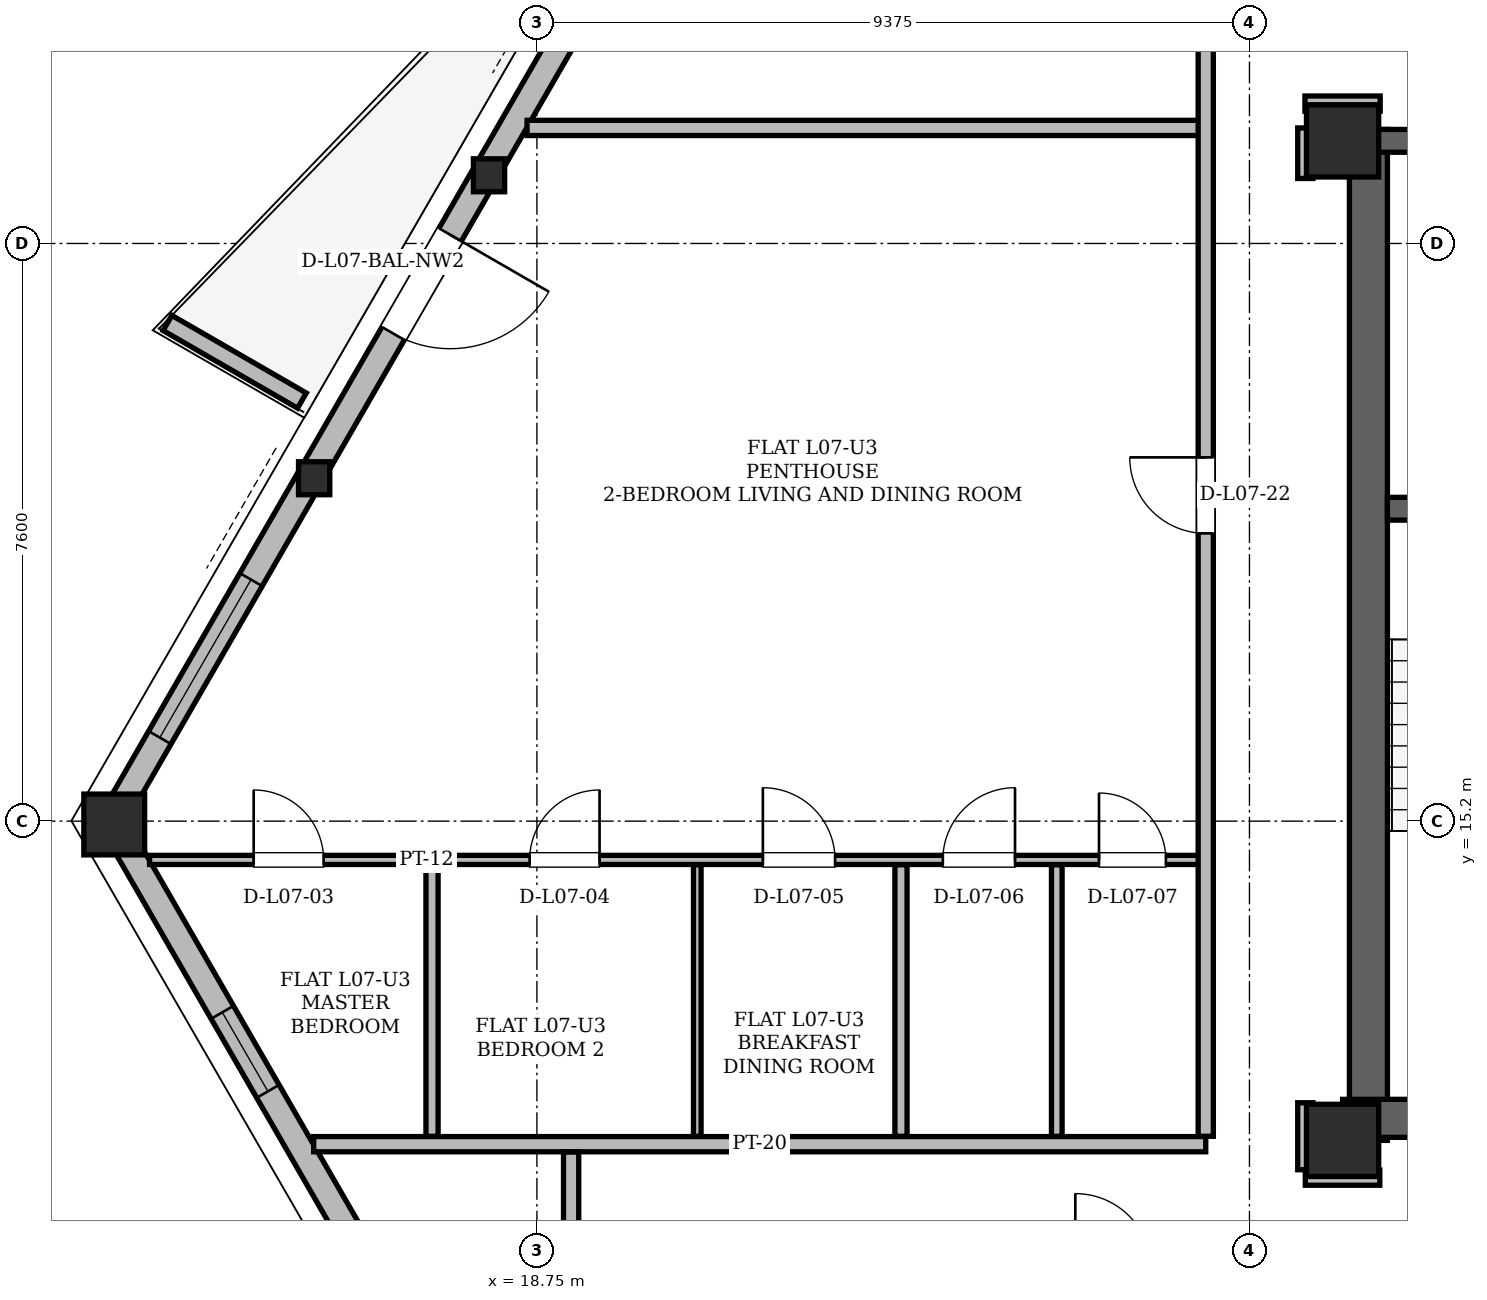
"""IFC4 building model, lengths in metres.
Left out: names, types, materials, properties, quantities, classifications, styles, units other than length and angle.
Written with IfcOpenShell. Run it as: python <this file> out.ifc"""

import sys

from ifc_helpers import new_model, si_unit, direction, frame, frame_2d, origin, origin_2d, place, context, subcontext, project, spatial, polyline, rectangle, hollow_rectangle, i_section, outline, extrude, element, fill, save


model = new_model("IFC4")
c1 = context("Model", 3, precision=1e-05, world=origin(), true_north=direction((0.0, 1.0)))
c2 = subcontext(c1, "Body", "Model", "MODEL_VIEW")
j1 = project(units=[si_unit("LENGTHUNIT", "METRE"), si_unit("PLANEANGLEUNIT", "RADIAN")], contexts=[c1])
p1 = place(None, origin())
s1 = spatial("IfcSite", under=j1, at=p1, CompositionType="ELEMENT")
p2 = place(p1, origin())
s2 = spatial("IfcBuilding", under=s1, at=p2, CompositionType="ELEMENT")
p3 = place(p2, frame((0.0, 0.0, 30.9)))
s3 = spatial("IfcBuildingStorey", under=s2, at=p3, CompositionType="ELEMENT", Elevation=30.9)
for number, where, z_axis, x_axis in (
    (1, (29.35, 11.0, 0.0), (0.0, 0.0, 1.0), (1.0, 0.0, 0.0)),
    (2, (29.35, 24.15, 0.0), (0.0, 0.0, 1.0), (1.0, 0.0, 0.0)),
):
    element("IfcColumn", number, at=place(p3, frame(where, z_axis=z_axis, x_axis=x_axis)), inside=s3, PredefinedType="COLUMN", context=c2, shape_type="SweptSolid", body=[
        extrude(hollow_rectangle(XDim=0.95, YDim=0.95, WallThickness=0.08, at=origin_2d()), origin(), (0.0, 0.0, 1.0), 3.6),
    ])
p4 = place(p3, frame((13.156, 15.204, 0.005), z_axis=(0.018346571143, -0.026500602762, 0.999480425712), x_axis=(0.822192191644, 0.56920997883, 0.0)))
e3 = element("IfcColumn", 3, at=p4, inside=s3, PredefinedType="COLUMN", context=c2, shape_type="SweptSolid", body=[
    extrude(hollow_rectangle(XDim=0.8, YDim=0.8, WallThickness=0.065, at=origin_2d()), origin(), (0.0, 0.0, 1.0), 3.593),
])
p5 = place(p3, frame((18.08, 23.732, 0.005), z_axis=(0.022425422026, -0.019299454107, 0.999562219933), x_axis=(0.652303294881, 0.757958053911, 0.0)))
e4 = element("IfcColumn", 4, at=p5, inside=s3, PredefinedType="COLUMN", context=c2, shape_type="SweptSolid", body=[
    extrude(i_section(OverallWidth=0.411, OverallDepth=0.434, WebThickness=0.036, FlangeThickness=0.057, at=origin_2d()), origin(), (0.0, 0.0, 1.0), 3.593),
])
p6 = place(p3, frame((15.782, 19.752, 0.005), z_axis=(0.020522033279, -0.022696553361, 0.999531746677), x_axis=(0.741746192232, 0.670680688785, 0.0)))
e5 = element("IfcColumn", 5, at=p6, inside=s3, PredefinedType="COLUMN", context=c2, shape_type="SweptSolid", body=[
    extrude(i_section(OverallWidth=0.411, OverallDepth=0.434, WebThickness=0.036, FlangeThickness=0.057, at=origin_2d()), origin(), (0.0, 0.0, 1.0), 3.593),
])
p7 = place(p3, frame((29.69, 11.0, 0.0), z_axis=(0.0, 0.0, 1.0), x_axis=(0.0, 1.0, 0.0)))
e6 = element("IfcWall", 6, at=p7, inside=s3, PredefinedType="SHEAR", context=c2, shape_type="SweptSolid", body=[
    extrude(rectangle(XDim=13.3, YDim=0.5, at=frame_2d((6.65, 0.0))), origin(), (0.0, 0.0, 1.0), 3.36),
])
p8 = place(p3, frame((29.35, 11.29, 0.0), z_axis=(0.0, 0.0, 1.0), x_axis=(1.0, 0.0, 0.0)))
e7 = element("IfcWall", 7, at=p8, inside=s3, PredefinedType="SHEAR", context=c2, shape_type="SweptSolid", body=[
    extrude(rectangle(XDim=7.1, YDim=0.5, at=frame_2d((3.55, 0.0))), origin(), (0.0, 0.0, 1.0), 3.36),
])
p9 = place(p3, frame((29.65, 24.15, 0.0), z_axis=(0.0, 0.0, 1.0), x_axis=(1.0, 0.0, 0.0)))
e8 = element("IfcWall", 8, at=p9, inside=s3, PredefinedType="SHEAR", context=c2, shape_type="SweptSolid", body=[
    extrude(rectangle(XDim=15.7, YDim=0.3, at=frame_2d((7.85, 0.0))), origin(), (0.0, 0.0, 1.0), 3.36),
])
p10 = place(p9, frame((1.7, 0.0, 0.0)))
e9 = element("IfcOpeningElement", 9, at=p10, cuts=e8, PredefinedType="OPENING", context=c2, shape_type="SweptSolid", body=[
    extrude(rectangle(XDim=1.2, YDim=2.2, at=frame_2d((0.6, 1.1))), frame((0.0, 0.15, 0.0), z_axis=(0.0, -1.0, 0.0), x_axis=(1.0, 0.0, 0.0)), (0.0, 0.0, 1.0), 0.3),
])
p11 = place(p9, frame((12.8, 0.0, 0.0)))
e10 = element("IfcOpeningElement", 10, at=p11, cuts=e8, PredefinedType="OPENING", context=c2, shape_type="SweptSolid", body=[
    extrude(rectangle(XDim=1.2, YDim=2.2, at=frame_2d((0.6, 1.1))), frame((0.0, 0.15, 0.0), z_axis=(0.0, -1.0, 0.0), x_axis=(1.0, 0.0, 0.0)), (0.0, 0.0, 1.0), 0.3),
])
p12 = place(p9, frame((6.55, 0.0, 0.0)))
e11 = element("IfcOpeningElement", 11, at=p12, cuts=e8, PredefinedType="OPENING", context=c2, shape_type="SweptSolid", body=[
    extrude(rectangle(XDim=0.9, YDim=2.05, at=frame_2d((0.45, 1.025))), frame((0.0, 0.15, 0.0), z_axis=(0.0, -1.0, 0.0), x_axis=(1.0, 0.0, 0.0)), (0.0, 0.0, 1.0), 0.3),
])
p13 = place(p9, frame((8.45, 0.0, 0.0)))
e12 = element("IfcOpeningElement", 12, at=p13, cuts=e8, PredefinedType="OPENING", context=c2, shape_type="SweptSolid", body=[
    extrude(rectangle(XDim=0.9, YDim=2.05, at=frame_2d((0.45, 1.025))), frame((0.0, 0.15, 0.0), z_axis=(0.0, -1.0, 0.0), x_axis=(1.0, 0.0, 0.0)), (0.0, 0.0, 1.0), 0.3),
])
p14 = place(p3, frame((29.94, 19.31, 0.0), z_axis=(0.0, 0.0, 1.0), x_axis=(1.0, 0.0, 0.0)))
e13 = element("IfcWall", 13, at=p14, inside=s3, PredefinedType="SHEAR", context=c2, shape_type="SweptSolid", body=[
    extrude(rectangle(XDim=4.01, YDim=0.3, at=frame_2d((2.005, 0.0))), origin(), (0.0, 0.0, 1.0), 3.36),
])
p15 = place(p14, frame((1.01, 0.0, 0.0)))
e14 = element("IfcOpeningElement", 14, at=p15, cuts=e13, PredefinedType="OPENING", context=c2, shape_type="SweptSolid", body=[
    extrude(rectangle(XDim=1.4, YDim=2.2, at=frame_2d((0.7, 1.1))), frame((0.0, 0.15, 0.0), z_axis=(0.0, -1.0, 0.0), x_axis=(1.0, 0.0, 0.0)), (0.0, 0.0, 1.0), 0.3),
])
p16 = place(p3, frame((13.156, 15.204, 0.0), z_axis=(0.0, 0.0, 1.0), x_axis=(0.500005775488, -0.866022069279, 0.0)))
e15 = element("IfcWall", 15, at=p16, inside=s3, PredefinedType="SOLIDWALL", context=c2, shape_type="SweptSolid", body=[
    extrude(rectangle(XDim=15.863, YDim=0.34, at=frame_2d((7.932, 0.0))), origin(), (0.0, 0.0, 1.0), 2.494),
])
p17 = place(p16, frame((2.909, 0.0, 0.85)))
e16 = element("IfcOpeningElement", 16, at=p17, cuts=e15, PredefinedType="OPENING", context=c2, shape_type="SweptSolid", body=[
    extrude(rectangle(XDim=1.2, YDim=1.48, at=frame_2d((0.6, 0.74))), frame((0.0, 0.17, 0.0), z_axis=(0.0, -1.0, 0.0), x_axis=(1.0, 0.0, 0.0)), (0.0, 0.0, 1.0), 0.34),
])
p18 = place(p3, frame((29.568, 43.631, 0.0), z_axis=(0.0, 0.0, 1.0), x_axis=(-0.500000372107, -0.866025188948, 0.0)))
e17 = element("IfcWall", 17, at=p18, inside=s3, PredefinedType="SOLIDWALL", context=c2, shape_type="SweptSolid", body=[
    extrude(rectangle(XDim=32.825, YDim=0.34, at=frame_2d((16.412, 0.0))), origin(), (0.0, 0.0, 1.0), 2.494),
])
p19 = place(p18, frame((6.159, 0.0, 0.0)))
e18 = element("IfcOpeningElement", 18, at=p19, cuts=e17, PredefinedType="OPENING", context=c2, shape_type="SweptSolid", body=[
    extrude(rectangle(XDim=1.5, YDim=2.2, at=frame_2d((0.75, 1.1))), frame((0.0, 0.17, 0.0), z_axis=(0.0, -1.0, 0.0), x_axis=(1.0, 0.0, 0.0)), (0.0, 0.0, 1.0), 0.34),
])
p20 = place(p18, frame((23.92, 0.0, 0.0)))
e19 = element("IfcOpeningElement", 19, at=p20, cuts=e17, PredefinedType="OPENING", context=c2, shape_type="SweptSolid", body=[
    extrude(rectangle(XDim=1.5, YDim=2.2, at=frame_2d((0.75, 1.1))), frame((0.0, 0.17, 0.0), z_axis=(0.0, -1.0, 0.0), x_axis=(1.0, 0.0, 0.0)), (0.0, 0.0, 1.0), 0.34),
])
p21 = place(p18, frame((29.16, 0.0, 0.85)))
e20 = element("IfcOpeningElement", 20, at=p21, cuts=e17, PredefinedType="OPENING", context=c2, shape_type="SweptSolid", body=[
    extrude(rectangle(XDim=2.4, YDim=1.534, at=frame_2d((1.2, 0.767))), frame((0.0, 0.17, 0.0), z_axis=(0.0, -1.0, 0.0), x_axis=(1.0, 0.0, 0.0)), (0.0, 0.0, 1.0), 0.34),
])
p22 = place(p18, frame((10.76, 0.0, 0.85)))
e21 = element("IfcOpeningElement", 21, at=p22, cuts=e17, PredefinedType="OPENING", context=c2, shape_type="SweptSolid", body=[
    extrude(rectangle(XDim=2.5, YDim=1.534, at=frame_2d((1.25, 0.767))), frame((0.0, 0.17, 0.0), z_axis=(0.0, -1.0, 0.0), x_axis=(1.0, 0.0, 0.0)), (0.0, 0.0, 1.0), 0.34),
])
p23 = place(p18, frame((17.732, 0.0, 0.85)))
e22 = element("IfcOpeningElement", 22, at=p23, cuts=e17, PredefinedType="OPENING", context=c2, shape_type="SweptSolid", body=[
    extrude(rectangle(XDim=2.4, YDim=1.534, at=frame_2d((1.2, 0.767))), frame((0.0, 0.17, 0.0), z_axis=(0.0, -1.0, 0.0), x_axis=(1.0, 0.0, 0.0)), (0.0, 0.0, 1.0), 0.34),
])
p24 = place(p18, frame((1.539, 0.0, 0.85)))
e23 = element("IfcOpeningElement", 23, at=p24, cuts=e17, PredefinedType="OPENING", context=c2, shape_type="SweptSolid", body=[
    extrude(rectangle(XDim=1.2, YDim=1.48, at=frame_2d((0.6, 0.74))), frame((0.0, 0.17, 0.0), z_axis=(0.0, -1.0, 0.0), x_axis=(1.0, 0.0, 0.0)), (0.0, 0.0, 1.0), 0.34),
])
p25 = place(p18, frame((0.69, 0.0, 0.85)))
e24 = element("IfcOpeningElement", 24, at=p25, cuts=e17, PredefinedType="OPENING", context=c2, shape_type="SweptSolid", body=[
    extrude(rectangle(XDim=0.7, YDim=1.2, at=frame_2d((0.35, 0.6))), frame((0.0, 0.17, 0.0), z_axis=(0.0, -1.0, 0.0), x_axis=(1.0, 0.0, 0.0)), (0.0, 0.0, 1.0), 0.34),
])
p26 = place(p3, frame((15.658, 20.733, 0.0), z_axis=(0.0, 0.0, 1.0), x_axis=(-0.866042246008, 0.499970827278, 0.0)))
e25 = element("IfcWall", 25, at=p26, inside=s3, PredefinedType="PARAPET", context=c2, shape_type="SweptSolid", body=[
    extrude(outline(polyline([(0.0, 0.0), (2.042, 0.0), (2.042, 1.1), (0.0, 1.32), (0.0, 0.0)])), frame((0.0, 0.115, 0.0), z_axis=(0.0, -1.0, 0.0), x_axis=(1.0, 0.0, 0.0)), (0.0, 0.0, 1.0), 0.23),
])
p27 = place(p3, frame((28.86, 10.51, 0.0), z_axis=(0.0, 0.0, 1.0), x_axis=(1.0, 0.0, 0.0)))
e26 = element("IfcWall", 26, at=p27, inside=s3, PredefinedType="PARTITIONING", context=c2, shape_type="SweptSolid", body=[
    extrude(rectangle(XDim=0.98, YDim=0.2, at=frame_2d((0.49, 0.0))), origin(), (0.0, 0.0, 1.0), 2.738),
])
p28 = place(p3, frame((15.813, 10.95, 0.0), z_axis=(0.0, 0.0, 1.0), x_axis=(1.0, 0.0, 0.0)))
e27 = element("IfcWall", 27, at=p28, inside=s3, PredefinedType="PARTITIONING", context=c2, shape_type="SweptSolid", body=[
    extrude(rectangle(XDim=11.737, YDim=0.2, at=frame_2d((5.869, 0.0))), origin(), (0.0, 0.0, 1.0), 3.36),
])
p29 = place(p3, frame((13.654, 14.69, 0.0), z_axis=(0.0, 0.0, 1.0), x_axis=(1.0, 0.0, 0.0)))
e28 = element("IfcWall", 28, at=p29, inside=s3, PredefinedType="PARTITIONING", context=c2, shape_type="SweptSolid", body=[
    extrude(rectangle(XDim=13.947, YDim=0.12, at=frame_2d((6.973, 0.0))), origin(), (0.0, 0.0, 1.0), 2.738),
])
p30 = place(p29, frame((1.37, 0.0, 0.0)))
e29 = element("IfcOpeningElement", 29, at=p30, cuts=e28, PredefinedType="OPENING", context=c2, shape_type="SweptSolid", body=[
    extrude(rectangle(XDim=0.92, YDim=2.12, at=frame_2d((0.46, 1.06))), frame((0.0, 0.06, 0.0), z_axis=(0.0, -1.0, 0.0), x_axis=(1.0, 0.0, 0.0)), (0.0, 0.0, 1.0), 0.12),
])
p31 = place(p29, frame((5.001, 0.0, 0.0)))
e30 = element("IfcOpeningElement", 30, at=p31, cuts=e28, PredefinedType="OPENING", context=c2, shape_type="SweptSolid", body=[
    extrude(rectangle(XDim=0.92, YDim=2.12, at=frame_2d((0.46, 1.06))), frame((0.0, 0.06, 0.0), z_axis=(0.0, -1.0, 0.0), x_axis=(1.0, 0.0, 0.0)), (0.0, 0.0, 1.0), 0.12),
])
p32 = place(p29, frame((8.069, 0.0, 0.0)))
e31 = element("IfcOpeningElement", 31, at=p32, cuts=e28, PredefinedType="OPENING", context=c2, shape_type="SweptSolid", body=[
    extrude(rectangle(XDim=0.95, YDim=2.1, at=frame_2d((0.475, 1.05))), frame((0.0, 0.06, 0.0), z_axis=(0.0, -1.0, 0.0), x_axis=(1.0, 0.0, 0.0)), (0.0, 0.0, 1.0), 0.12),
])
p33 = place(p29, frame((10.437, 0.0, 0.0)))
e32 = element("IfcOpeningElement", 32, at=p33, cuts=e28, PredefinedType="OPENING", context=c2, shape_type="SweptSolid", body=[
    extrude(rectangle(XDim=0.95, YDim=2.1, at=frame_2d((0.475, 1.05))), frame((0.0, 0.06, 0.0), z_axis=(0.0, -1.0, 0.0), x_axis=(1.0, 0.0, 0.0)), (0.0, 0.0, 1.0), 0.12),
])
p34 = place(p29, frame((12.492, 0.0, 0.0)))
e33 = element("IfcOpeningElement", 33, at=p34, cuts=e28, PredefinedType="OPENING", context=c2, shape_type="SweptSolid", body=[
    extrude(rectangle(XDim=0.88, YDim=2.08, at=frame_2d((0.44, 1.04))), frame((0.0, 0.06, 0.0), z_axis=(0.0, -1.0, 0.0), x_axis=(1.0, 0.0, 0.0)), (0.0, 0.0, 1.0), 0.12),
])
p35 = place(p3, frame((18.62, 24.32, 0.0), z_axis=(0.0, 0.0, 1.0), x_axis=(1.0, 0.0, 0.0)))
e34 = element("IfcWall", 34, at=p35, inside=s3, PredefinedType="PARTITIONING", context=c2, shape_type="SweptSolid", body=[
    extrude(rectangle(XDim=8.93, YDim=0.2, at=frame_2d((4.465, 0.0))), origin(), (0.0, 0.0, 1.0), 2.494),
])
p36 = place(p3, frame((28.855, 24.64, 0.0), z_axis=(0.0, 0.0, 1.0), x_axis=(1.0, 0.0, 0.0)))
e35 = element("IfcWall", 35, at=p36, inside=s3, PredefinedType="PARTITIONING", context=c2, shape_type="SweptSolid", body=[
    extrude(rectangle(XDim=0.99, YDim=0.2, at=frame_2d((0.495, 0.0))), origin(), (0.0, 0.0, 1.0), 2.738),
])
p37 = place(p3, frame((17.37, 11.054, 0.0), z_axis=(0.0, 0.0, 1.0), x_axis=(0.0, 1.0, 0.0)))
e36 = element("IfcWall", 36, at=p37, inside=s3, PredefinedType="PARTITIONING", context=c2, shape_type="SweptSolid", body=[
    extrude(rectangle(XDim=3.572, YDim=0.16, at=frame_2d((1.786, 0.0))), origin(), (0.0, 0.0, 1.0), 2.738),
])
p38 = place(p3, frame((19.2, 9.404, 0.0), z_axis=(0.0, 0.0, 1.0), x_axis=(0.0, 1.0, 0.0)))
e37 = element("IfcWall", 37, at=p38, inside=s3, PredefinedType="PARTITIONING", context=c2, shape_type="SweptSolid", body=[
    extrude(rectangle(XDim=1.442, YDim=0.2, at=frame_2d((0.721, 0.0))), origin(), (0.0, 0.0, 1.0), 3.36),
])
p39 = place(p3, frame((20.86, 11.054, 0.0), z_axis=(0.0, 0.0, 1.0), x_axis=(0.0, 1.0, 0.0)))
e38 = element("IfcWall", 38, at=p39, inside=s3, PredefinedType="PARTITIONING", context=c2, shape_type="SweptSolid", body=[
    extrude(rectangle(XDim=3.572, YDim=0.1, at=frame_2d((1.786, 0.0))), origin(), (0.0, 0.0, 1.0), 2.738),
])
p40 = place(p3, frame((23.54, 11.054, 0.0), z_axis=(0.0, 0.0, 1.0), x_axis=(0.0, 1.0, 0.0)))
e39 = element("IfcWall", 39, at=p40, inside=s3, PredefinedType="PARTITIONING", context=c2, shape_type="SweptSolid", body=[
    extrude(rectangle(XDim=3.572, YDim=0.16, at=frame_2d((1.786, 0.0))), origin(), (0.0, 0.0, 1.0), 2.738),
])
p41 = place(p3, frame((25.59, 11.054, 0.0), z_axis=(0.0, 0.0, 1.0), x_axis=(0.0, 1.0, 0.0)))
e40 = element("IfcWall", 40, at=p41, inside=s3, PredefinedType="PARTITIONING", context=c2, shape_type="SweptSolid", body=[
    extrude(rectangle(XDim=3.572, YDim=0.14, at=frame_2d((1.786, 0.0))), origin(), (0.0, 0.0, 1.0), 2.738),
])
p42 = place(p3, frame((27.55, 11.054, 0.0), z_axis=(0.0, 0.0, 1.0), x_axis=(0.0, 1.0, 0.0)))
e41 = element("IfcWall", 41, at=p42, inside=s3, PredefinedType="PARTITIONING", context=c2, shape_type="SweptSolid", body=[
    extrude(rectangle(XDim=14.812, YDim=0.2, at=frame_2d((7.406, 0.0))), origin(), (0.0, 0.0, 1.0), 2.738),
])
p43 = place(p42, frame((7.932, 0.0, 0.0)))
e42 = element("IfcOpeningElement", 42, at=p43, cuts=e41, PredefinedType="OPENING", context=c2, shape_type="SweptSolid", body=[
    extrude(rectangle(XDim=1.0, YDim=2.18, at=frame_2d((0.5, 1.09))), frame((0.0, 0.1, 0.0), z_axis=(0.0, -1.0, 0.0), x_axis=(1.0, 0.0, 0.0)), (0.0, 0.0, 1.0), 0.2),
])
p44 = place(p3, frame((28.86, 10.614, 0.0), z_axis=(0.0, 0.0, 1.0), x_axis=(0.0, 1.0, 0.0)))
e43 = element("IfcWall", 43, at=p44, inside=s3, PredefinedType="PARTITIONING", context=c2, shape_type="SweptSolid", body=[
    extrude(rectangle(XDim=0.881, YDim=0.2, at=frame_2d((0.44, 0.0))), origin(), (0.0, 0.0, 1.0), 2.738),
])
p45 = place(p3, frame((28.86, 23.655, 0.0), z_axis=(0.0, 0.0, 1.0), x_axis=(0.0, 1.0, 0.0)))
e44 = element("IfcWall", 44, at=p45, inside=s3, PredefinedType="PARTITIONING", context=c2, shape_type="SweptSolid", body=[
    extrude(rectangle(XDim=0.665, YDim=0.2, at=frame_2d((0.333, 0.0))), origin(), (0.0, 0.0, 1.0), 3.36),
])
p46 = place(p20, origin())
e45 = element("IfcDoor", 45, at=p46, inside=s3, OperationType="SINGLE_SWING_LEFT", PredefinedType="DOOR", context=c2, shape_type="SweptSolid", body=[
    extrude(rectangle(XDim=1.5, YDim=2.2, at=frame_2d((0.75, 1.1))), frame((0.0, 0.025, 0.0), z_axis=(0.0, -1.0, 0.0), x_axis=(1.0, 0.0, 0.0)), (0.0, 0.0, 1.0), 0.05),
])
fill(e19, e45)
p47 = place(p21, origin())
e46 = element("IfcWindow", 46, at=p47, inside=s3, PartitioningType="SINGLE_PANEL", PredefinedType="WINDOW", context=c2, shape_type="SweptSolid", body=[
    extrude(rectangle(XDim=2.4, YDim=1.534, at=frame_2d((1.2, 0.767))), frame((0.0, 0.03, 0.0), z_axis=(0.0, -1.0, 0.0), x_axis=(1.0, 0.0, 0.0)), (0.0, 0.0, 1.0), 0.06),
])
fill(e20, e46)
p48 = place(p17, origin())
e47 = element("IfcWindow", 47, at=p48, inside=s3, PartitioningType="SINGLE_PANEL", PredefinedType="WINDOW", context=c2, shape_type="SweptSolid", body=[
    extrude(rectangle(XDim=1.2, YDim=1.48, at=frame_2d((0.6, 0.74))), frame((0.0, 0.03, 0.0), z_axis=(0.0, -1.0, 0.0), x_axis=(1.0, 0.0, 0.0)), (0.0, 0.0, 1.0), 0.06),
])
fill(e16, e47)
p49 = place(p30, origin())
e48 = element("IfcDoor", 48, at=p49, inside=s3, OperationType="SINGLE_SWING_LEFT", PredefinedType="DOOR", context=c2, shape_type="SweptSolid", body=[
    extrude(rectangle(XDim=0.92, YDim=2.12, at=frame_2d((0.46, 1.06))), frame((0.0, 0.025, 0.0), z_axis=(0.0, -1.0, 0.0), x_axis=(1.0, 0.0, 0.0)), (0.0, 0.0, 1.0), 0.05),
])
fill(e29, e48)
p50 = place(p31, origin())
e49 = element("IfcDoor", 49, at=p50, inside=s3, OperationType="SINGLE_SWING_RIGHT", PredefinedType="DOOR", context=c2, shape_type="SweptSolid", body=[
    extrude(rectangle(XDim=0.92, YDim=2.12, at=frame_2d((0.46, 1.06))), frame((0.0, 0.025, 0.0), z_axis=(0.0, -1.0, 0.0), x_axis=(1.0, 0.0, 0.0)), (0.0, 0.0, 1.0), 0.05),
])
fill(e30, e49)
p51 = place(p32, origin())
e50 = element("IfcDoor", 50, at=p51, inside=s3, OperationType="SINGLE_SWING_LEFT", PredefinedType="DOOR", context=c2, shape_type="SweptSolid", body=[
    extrude(rectangle(XDim=0.95, YDim=2.1, at=frame_2d((0.475, 1.05))), frame((0.0, 0.025, 0.0), z_axis=(0.0, -1.0, 0.0), x_axis=(1.0, 0.0, 0.0)), (0.0, 0.0, 1.0), 0.05),
])
fill(e31, e50)
p52 = place(p33, origin())
e51 = element("IfcDoor", 51, at=p52, inside=s3, OperationType="SINGLE_SWING_RIGHT", PredefinedType="DOOR", context=c2, shape_type="SweptSolid", body=[
    extrude(rectangle(XDim=0.95, YDim=2.1, at=frame_2d((0.475, 1.05))), frame((0.0, 0.025, 0.0), z_axis=(0.0, -1.0, 0.0), x_axis=(1.0, 0.0, 0.0)), (0.0, 0.0, 1.0), 0.05),
])
fill(e32, e51)
p53 = place(p34, origin())
e52 = element("IfcDoor", 52, at=p53, inside=s3, OperationType="SINGLE_SWING_LEFT", PredefinedType="DOOR", context=c2, shape_type="SweptSolid", body=[
    extrude(rectangle(XDim=0.88, YDim=2.08, at=frame_2d((0.44, 1.04))), frame((0.0, 0.025, 0.0), z_axis=(0.0, -1.0, 0.0), x_axis=(1.0, 0.0, 0.0)), (0.0, 0.0, 1.0), 0.05),
])
fill(e33, e52)
p54 = place(p43, origin())
e53 = element("IfcDoor", 53, at=p54, inside=s3, OperationType="SINGLE_SWING_RIGHT", PredefinedType="DOOR", context=c2, shape_type="SweptSolid", body=[
    extrude(rectangle(XDim=1.0, YDim=2.18, at=frame_2d((0.5, 1.09))), frame((0.0, 0.025, 0.0), z_axis=(0.0, -1.0, 0.0), x_axis=(1.0, 0.0, 0.0)), (0.0, 0.0, 1.0), 0.05),
])
fill(e42, e53)
save(model, sys.argv[1])
